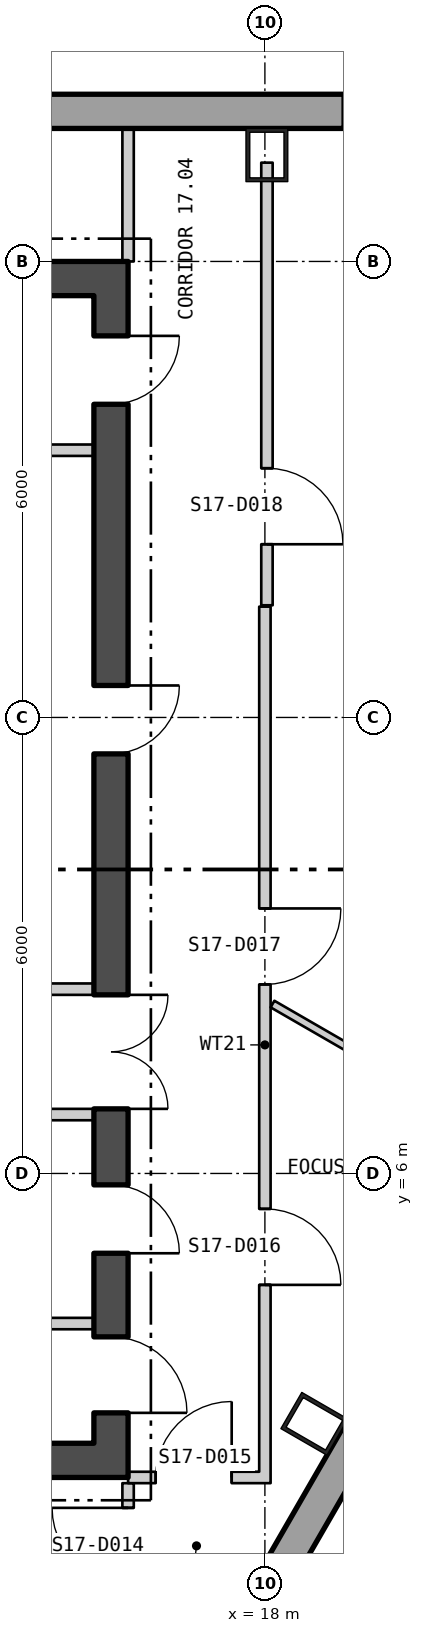
"""IFC4 building model, lengths in metres.
Left out: names, types, materials, properties, quantities, classifications, styles, units other than length and angle.
Written with IfcOpenShell. Run it as: python <this file> out.ifc"""

import sys

from ifc_helpers import new_model, si_unit, direction, frame, frame_2d, origin, origin_2d, place, context, subcontext, project, spatial, polyline, rectangle, hollow_rectangle, outline, extrude, element, fill, save


model = new_model("IFC4")
c1 = context("Model", 3, precision=1e-05, world=origin(), true_north=direction((0.0, 1.0)))
c2 = subcontext(c1, "Body", "Model", "MODEL_VIEW")
j1 = project(units=[si_unit("LENGTHUNIT", "METRE"), si_unit("PLANEANGLEUNIT", "RADIAN")], contexts=[c1])
p1 = place(None, origin())
s1 = spatial("IfcSite", under=j1, at=p1, CompositionType="ELEMENT")
p2 = place(p1, origin())
s2 = spatial("IfcBuilding", under=s1, at=p2, CompositionType="ELEMENT")
p3 = place(p2, frame((0.0, 0.0, 227.7)))
s3 = spatial("IfcBuildingStorey", under=s2, at=p3, CompositionType="ELEMENT", Elevation=227.7)
for number, where, z_axis, x_axis in (
    (1, (18.026, 19.4, 0.0), (0.0, 0.0, 1.0), (-1.0, 0.0, 0.0)),
    (2, (18.651, 2.706, 0.0), (0.0, 0.0, 1.0), (0.5, 0.866, 0.0)),
):
    element("IfcColumn", number, at=place(p3, frame(where, z_axis=z_axis, x_axis=x_axis)), inside=s3, PredefinedType="COLUMN", context=c2, shape_type="SweptSolid", body=[
        extrude(hollow_rectangle(XDim=0.55, YDim=0.7, WallThickness=0.05, at=origin_2d()), origin(), (0.0, 0.0, 1.0), 3.9),
    ])
p4 = place(p3, frame((22.865, 19.975, -0.4), z_axis=(0.0, 0.0, 1.0), x_axis=(-1.0, 0.0, 0.0)))
e3 = element("IfcWall", 3, at=p4, inside=s3, PredefinedType="SOLIDWALL", context=c2, shape_type="SweptSolid", body=[
    extrude(outline(polyline([(-0.13, -0.225), (45.86, -0.225), (45.6, 0.225), (0.13, 0.225), (-0.13, -0.225)])), origin(), (0.0, 0.0, 1.0), 3.9),
])
p5 = place(p4, frame((1.424, 0.0, 1.3)))
e4 = element("IfcOpeningElement", 4, at=p5, cuts=e3, PredefinedType="OPENING", context=c2, shape_type="SweptSolid", body=[
    extrude(rectangle(XDim=2.4, YDim=2.0, at=frame_2d((1.2, 1.0))), frame((0.0, 0.235, 0.0), z_axis=(0.0, -1.0, 0.0), x_axis=(1.0, 0.0, 0.0)), (0.0, 0.0, 1.0), 0.47),
])
p6 = place(p4, frame((10.399, 0.0, 1.3)))
e5 = element("IfcOpeningElement", 5, at=p6, cuts=e3, PredefinedType="OPENING", context=c2, shape_type="SweptSolid", body=[
    extrude(rectangle(XDim=2.4, YDim=2.0, at=frame_2d((1.2, 1.0))), frame((0.0, 0.235, 0.0), z_axis=(0.0, -1.0, 0.0), x_axis=(1.0, 0.0, 0.0)), (0.0, 0.0, 1.0), 0.47),
])
p7 = place(p4, frame((14.905, 0.0, 1.3)))
e6 = element("IfcOpeningElement", 6, at=p7, cuts=e3, PredefinedType="OPENING", context=c2, shape_type="SweptSolid", body=[
    extrude(rectangle(XDim=2.4, YDim=2.0, at=frame_2d((1.2, 1.0))), frame((0.0, 0.235, 0.0), z_axis=(0.0, -1.0, 0.0), x_axis=(1.0, 0.0, 0.0)), (0.0, 0.0, 1.0), 0.47),
])
p8 = place(p4, frame((19.412, 0.0, 1.3)))
e7 = element("IfcOpeningElement", 7, at=p8, cuts=e3, PredefinedType="OPENING", context=c2, shape_type="SweptSolid", body=[
    extrude(rectangle(XDim=2.4, YDim=2.0, at=frame_2d((1.2, 1.0))), frame((0.0, 0.235, 0.0), z_axis=(0.0, -1.0, 0.0), x_axis=(1.0, 0.0, 0.0)), (0.0, 0.0, 1.0), 0.47),
])
p9 = place(p4, frame((23.918, 0.0, 1.3)))
e8 = element("IfcOpeningElement", 8, at=p9, cuts=e3, PredefinedType="OPENING", context=c2, shape_type="SweptSolid", body=[
    extrude(rectangle(XDim=2.4, YDim=2.0, at=frame_2d((1.2, 1.0))), frame((0.0, 0.235, 0.0), z_axis=(0.0, -1.0, 0.0), x_axis=(1.0, 0.0, 0.0)), (0.0, 0.0, 1.0), 0.47),
])
p10 = place(p4, frame((28.425, 0.0, 1.3)))
e9 = element("IfcOpeningElement", 9, at=p10, cuts=e3, PredefinedType="OPENING", context=c2, shape_type="SweptSolid", body=[
    extrude(rectangle(XDim=2.4, YDim=2.0, at=frame_2d((1.2, 1.0))), frame((0.0, 0.235, 0.0), z_axis=(0.0, -1.0, 0.0), x_axis=(1.0, 0.0, 0.0)), (0.0, 0.0, 1.0), 0.47),
])
p11 = place(p4, frame((32.932, 0.0, 1.3)))
e10 = element("IfcOpeningElement", 10, at=p11, cuts=e3, PredefinedType="OPENING", context=c2, shape_type="SweptSolid", body=[
    extrude(rectangle(XDim=2.4, YDim=2.0, at=frame_2d((1.2, 1.0))), frame((0.0, 0.235, 0.0), z_axis=(0.0, -1.0, 0.0), x_axis=(1.0, 0.0, 0.0)), (0.0, 0.0, 1.0), 0.47),
])
p12 = place(p4, frame((41.907, 0.0, 1.3)))
e11 = element("IfcOpeningElement", 11, at=p12, cuts=e3, PredefinedType="OPENING", context=c2, shape_type="SweptSolid", body=[
    extrude(rectangle(XDim=2.4, YDim=2.0, at=frame_2d((1.2, 1.0))), frame((0.0, 0.235, 0.0), z_axis=(0.0, -1.0, 0.0), x_axis=(1.0, 0.0, 0.0)), (0.0, 0.0, 1.0), 0.47),
])
p13 = place(p3, frame((3.21, -25.189, -0.18), z_axis=(0.0, 0.0, 1.0), x_axis=(0.499999194392, 0.866025868902, 0.0)))
e12 = element("IfcWall", 12, at=p13, inside=s3, PredefinedType="SOLIDWALL", context=c2, shape_type="SweptSolid", body=[
    extrude(outline(polyline([(-0.13, -0.225), (45.86, -0.225), (45.6, 0.225), (0.13, 0.225), (-0.13, -0.225)])), origin(), (0.0, 0.0, 1.0), 3.68),
])
p14 = place(p13, frame((1.424, 0.0, 1.08)))
e13 = element("IfcOpeningElement", 13, at=p14, cuts=e12, PredefinedType="OPENING", context=c2, shape_type="SweptSolid", body=[
    extrude(rectangle(XDim=2.4, YDim=2.0, at=frame_2d((1.2, 1.0))), frame((0.0, 0.235, 0.0), z_axis=(0.0, -1.0, 0.0), x_axis=(1.0, 0.0, 0.0)), (0.0, 0.0, 1.0), 0.47),
])
p15 = place(p13, frame((5.892, 0.0, 1.08)))
e14 = element("IfcOpeningElement", 14, at=p15, cuts=e12, PredefinedType="OPENING", context=c2, shape_type="SweptSolid", body=[
    extrude(rectangle(XDim=2.4, YDim=2.0, at=frame_2d((1.2, 1.0))), frame((0.0, 0.235, 0.0), z_axis=(0.0, -1.0, 0.0), x_axis=(1.0, 0.0, 0.0)), (0.0, 0.0, 1.0), 0.47),
])
p16 = place(p13, frame((10.399, 0.0, 1.08)))
e15 = element("IfcOpeningElement", 15, at=p16, cuts=e12, PredefinedType="OPENING", context=c2, shape_type="SweptSolid", body=[
    extrude(rectangle(XDim=2.4, YDim=2.0, at=frame_2d((1.2, 1.0))), frame((0.0, 0.235, 0.0), z_axis=(0.0, -1.0, 0.0), x_axis=(1.0, 0.0, 0.0)), (0.0, 0.0, 1.0), 0.47),
])
p17 = place(p13, frame((14.905, 0.0, 1.08)))
e16 = element("IfcOpeningElement", 16, at=p17, cuts=e12, PredefinedType="OPENING", context=c2, shape_type="SweptSolid", body=[
    extrude(rectangle(XDim=2.4, YDim=2.0, at=frame_2d((1.2, 1.0))), frame((0.0, 0.235, 0.0), z_axis=(0.0, -1.0, 0.0), x_axis=(1.0, 0.0, 0.0)), (0.0, 0.0, 1.0), 0.47),
])
p18 = place(p13, frame((19.412, 0.0, 1.08)))
e17 = element("IfcOpeningElement", 17, at=p18, cuts=e12, PredefinedType="OPENING", context=c2, shape_type="SweptSolid", body=[
    extrude(rectangle(XDim=2.4, YDim=2.0, at=frame_2d((1.2, 1.0))), frame((0.0, 0.235, 0.0), z_axis=(0.0, -1.0, 0.0), x_axis=(1.0, 0.0, 0.0)), (0.0, 0.0, 1.0), 0.47),
])
p19 = place(p13, frame((23.918, 0.0, 1.08)))
e18 = element("IfcOpeningElement", 18, at=p19, cuts=e12, PredefinedType="OPENING", context=c2, shape_type="SweptSolid", body=[
    extrude(rectangle(XDim=2.4, YDim=2.0, at=frame_2d((1.2, 1.0))), frame((0.0, 0.235, 0.0), z_axis=(0.0, -1.0, 0.0), x_axis=(1.0, 0.0, 0.0)), (0.0, 0.0, 1.0), 0.47),
])
p20 = place(p13, frame((32.932, 0.0, 1.08)))
e19 = element("IfcOpeningElement", 19, at=p20, cuts=e12, PredefinedType="OPENING", context=c2, shape_type="SweptSolid", body=[
    extrude(rectangle(XDim=2.4, YDim=2.0, at=frame_2d((1.2, 1.0))), frame((0.0, 0.235, 0.0), z_axis=(0.0, -1.0, 0.0), x_axis=(1.0, 0.0, 0.0)), (0.0, 0.0, 1.0), 0.47),
])
p21 = place(p13, frame((37.438, 0.0, 1.08)))
e20 = element("IfcOpeningElement", 20, at=p21, cuts=e12, PredefinedType="OPENING", context=c2, shape_type="SweptSolid", body=[
    extrude(rectangle(XDim=2.4, YDim=2.0, at=frame_2d((1.2, 1.0))), frame((0.0, 0.235, 0.0), z_axis=(0.0, -1.0, 0.0), x_axis=(1.0, 0.0, 0.0)), (0.0, 0.0, 1.0), 0.47),
])
p22 = place(p13, frame((41.907, 0.0, 1.08)))
e21 = element("IfcOpeningElement", 21, at=p22, cuts=e12, PredefinedType="OPENING", context=c2, shape_type="SweptSolid", body=[
    extrude(rectangle(XDim=2.4, YDim=2.0, at=frame_2d((1.2, 1.0))), frame((0.0, 0.235, 0.0), z_axis=(0.0, -1.0, 0.0), x_axis=(1.0, 0.0, 0.0)), (0.0, 0.0, 1.0), 0.47),
])
p23 = place(p3, frame((-16.2, 2.225, 0.0), z_axis=(0.0, 0.0, 1.0), x_axis=(1.0, 0.0, 0.0)))
e22 = element("IfcWall", 22, at=p23, inside=s3, PredefinedType="SHEAR", context=c2, shape_type="SweptSolid", body=[
    extrude(rectangle(XDim=32.4, YDim=0.45, at=frame_2d((16.2, 0.0))), origin(), (0.0, 0.0, 1.0), 3.7),
])
p24 = place(p23, frame((10.7, 0.0, 0.0)))
e23 = element("IfcOpeningElement", 23, at=p24, cuts=e22, PredefinedType="OPENING", context=c2, shape_type="SweptSolid", body=[
    extrude(rectangle(XDim=1.8, YDim=2.4, at=frame_2d((0.9, 1.2))), frame((0.0, 0.235, 0.0), z_axis=(0.0, -1.0, 0.0), x_axis=(1.0, 0.0, 0.0)), (0.0, 0.0, 1.0), 0.47),
])
p25 = place(p23, frame((20.7, 0.0, 0.0)))
e24 = element("IfcOpeningElement", 24, at=p25, cuts=e22, PredefinedType="OPENING", context=c2, shape_type="SweptSolid", body=[
    extrude(rectangle(XDim=1.8, YDim=2.4, at=frame_2d((0.9, 1.2))), frame((0.0, 0.235, 0.0), z_axis=(0.0, -1.0, 0.0), x_axis=(1.0, 0.0, 0.0)), (0.0, 0.0, 1.0), 0.47),
])
p26 = place(p3, frame((-16.2, 17.775, 0.0), z_axis=(0.0, 0.0, 1.0), x_axis=(1.0, 0.0, 0.0)))
e25 = element("IfcWall", 25, at=p26, inside=s3, PredefinedType="SHEAR", context=c2, shape_type="SweptSolid", body=[
    extrude(rectangle(XDim=32.4, YDim=0.45, at=frame_2d((16.2, 0.0))), origin(), (0.0, 0.0, 1.0), 3.7),
])
p27 = place(p3, frame((15.975, 2.45, 0.0), z_axis=(0.0, 0.0, 1.0), x_axis=(0.0, 1.0, 0.0)))
e26 = element("IfcWall", 26, at=p27, inside=s3, PredefinedType="SHEAR", context=c2, shape_type="SweptSolid", body=[
    extrude(rectangle(XDim=15.1, YDim=0.45, at=frame_2d((7.55, 0.0))), origin(), (0.0, 0.0, 1.0), 3.7),
])
p28 = place(p27, frame((4.4, 0.0, 0.0)))
e27 = element("IfcOpeningElement", 27, at=p28, cuts=e26, PredefinedType="OPENING", context=c2, shape_type="SweptSolid", body=[
    extrude(rectangle(XDim=1.5, YDim=2.1, at=frame_2d((0.75, 1.05))), frame((0.0, 0.235, 0.0), z_axis=(0.0, -1.0, 0.0), x_axis=(1.0, 0.0, 0.0)), (0.0, 0.0, 1.0), 0.47),
])
p29 = place(p27, frame((0.4, 0.0, 0.0)))
e28 = element("IfcOpeningElement", 28, at=p29, cuts=e26, PredefinedType="OPENING", context=c2, shape_type="SweptSolid", body=[
    extrude(rectangle(XDim=1.0, YDim=2.1, at=frame_2d((0.5, 1.05))), frame((0.0, 0.235, 0.0), z_axis=(0.0, -1.0, 0.0), x_axis=(1.0, 0.0, 0.0)), (0.0, 0.0, 1.0), 0.47),
])
p30 = place(p27, frame((2.5, 0.0, 0.0)))
e29 = element("IfcOpeningElement", 29, at=p30, cuts=e26, PredefinedType="OPENING", context=c2, shape_type="SweptSolid", body=[
    extrude(rectangle(XDim=0.9, YDim=2.1, at=frame_2d((0.45, 1.05))), frame((0.0, 0.235, 0.0), z_axis=(0.0, -1.0, 0.0), x_axis=(1.0, 0.0, 0.0)), (0.0, 0.0, 1.0), 0.47),
])
p31 = place(p27, frame((9.071, 0.0, 0.0)))
e30 = element("IfcOpeningElement", 30, at=p31, cuts=e26, PredefinedType="OPENING", context=c2, shape_type="SweptSolid", body=[
    extrude(rectangle(XDim=0.9, YDim=2.1, at=frame_2d((0.45, 1.05))), frame((0.0, 0.235, 0.0), z_axis=(0.0, -1.0, 0.0), x_axis=(1.0, 0.0, 0.0)), (0.0, 0.0, 1.0), 0.47),
])
p32 = place(p27, frame((13.671, 0.0, 0.0)))
e31 = element("IfcOpeningElement", 31, at=p32, cuts=e26, PredefinedType="OPENING", context=c2, shape_type="SweptSolid", body=[
    extrude(rectangle(XDim=0.9, YDim=2.1, at=frame_2d((0.45, 1.05))), frame((0.0, 0.235, 0.0), z_axis=(0.0, -1.0, 0.0), x_axis=(1.0, 0.0, 0.0)), (0.0, 0.0, 1.0), 0.47),
])
for number, where, z_axis, x_axis in (
    (32, (14.5, 6.775, 0.0), (0.0, 0.0, 1.0), (1.0, 0.0, 0.0)),
    (33, (14.5, 8.425, 0.0), (0.0, 0.0, 1.0), (1.0, 0.0, 0.0)),
    (34, (14.5, 4.025, 0.0), (0.0, 0.0, 1.0), (1.0, 0.0, 0.0)),
    (35, (14.5, 15.516, 0.0), (0.0, 0.0, 1.0), (1.0, 0.0, 0.0)),
):
    element("IfcWall", number, at=place(p3, frame(where, z_axis=z_axis, x_axis=x_axis)), inside=s3, PredefinedType="PARTITIONING", context=c2, shape_type="SweptSolid", body=[
        extrude(rectangle(XDim=1.25, YDim=0.15, at=frame_2d((0.625, 0.0))), origin(), (0.0, 0.0, 1.0), 3.7),
    ])
p33 = place(p3, frame((16.2, 0.275, 0.0), z_axis=(0.0, 0.0, 1.0), x_axis=(0.0, 1.0, 0.0)))
e36 = element("IfcWall", 36, at=p33, inside=s3, PredefinedType="PARTITIONING", context=c2, shape_type="SweptSolid", body=[
    extrude(rectangle(XDim=1.65, YDim=0.15, at=frame_2d((0.825, 0.0))), origin(), (0.0, 0.0, 1.0), 3.7),
])
p34 = place(p33, frame((0.325, 0.0, 0.0)))
e37 = element("IfcOpeningElement", 37, at=p34, cuts=e36, PredefinedType="OPENING", context=c2, shape_type="SweptSolid", body=[
    extrude(rectangle(XDim=1.0, YDim=2.1, at=frame_2d((0.5, 1.05))), frame((0.0, 0.085, 0.0), z_axis=(0.0, -1.0, 0.0), x_axis=(1.0, 0.0, 0.0)), (0.0, 0.0, 1.0), 0.17),
])
p35 = place(p3, frame((16.2, 2.0, 0.0), z_axis=(0.0, 0.0, 1.0), x_axis=(1.0, 0.0, 0.0)))
e38 = element("IfcWall", 38, at=p35, inside=s3, PredefinedType="PARTITIONING", context=c2, shape_type="SweptSolid", body=[
    extrude(rectangle(XDim=1.725, YDim=0.15, at=frame_2d((0.863, 0.0))), origin(), (0.0, 0.0, 1.0), 3.11),
])
p36 = place(p35, frame((0.363, 0.0, 0.0)))
e39 = element("IfcOpeningElement", 39, at=p36, cuts=e38, PredefinedType="OPENING", context=c2, shape_type="SweptSolid", body=[
    extrude(rectangle(XDim=1.0, YDim=2.1, at=frame_2d((0.5, 1.05))), frame((0.0, 0.085, 0.0), z_axis=(0.0, -1.0, 0.0), x_axis=(1.0, 0.0, 0.0)), (0.0, 0.0, 1.0), 0.17),
])
p37 = place(p3, frame((16.2, 18.0, 0.0), z_axis=(0.0, 0.0, 1.0), x_axis=(0.0, 1.0, 0.0)))
e40 = element("IfcWall", 40, at=p37, inside=s3, PredefinedType="PARTITIONING", context=c2, shape_type="SweptSolid", body=[
    extrude(rectangle(XDim=1.75, YDim=0.15, at=frame_2d((0.875, 0.0))), origin(), (0.0, 0.0, 1.0), 3.7),
])
p38 = place(p3, frame((18.0, 1.925, 0.0), z_axis=(0.0, 0.0, 1.0), x_axis=(0.0, 1.0, 0.0)))
e41 = element("IfcWall", 41, at=p38, inside=s3, PredefinedType="PARTITIONING", context=c2, shape_type="SweptSolid", body=[
    extrude(rectangle(XDim=11.533, YDim=0.15, at=frame_2d((5.766, 0.0))), origin(), (0.0, 0.0, 1.0), 3.7),
])
p39 = place(p38, frame((2.609, 0.0, 0.0)))
e42 = element("IfcOpeningElement", 42, at=p39, cuts=e41, PredefinedType="OPENING", context=c2, shape_type="SweptSolid", body=[
    extrude(rectangle(XDim=1.0, YDim=2.1, at=frame_2d((0.5, 1.05))), frame((0.0, 0.085, 0.0), z_axis=(0.0, -1.0, 0.0), x_axis=(1.0, 0.0, 0.0)), (0.0, 0.0, 1.0), 0.17),
])
p40 = place(p38, frame((6.562, 0.0, 0.0)))
e43 = element("IfcOpeningElement", 43, at=p40, cuts=e41, PredefinedType="OPENING", context=c2, shape_type="SweptSolid", body=[
    extrude(rectangle(XDim=1.0, YDim=2.1, at=frame_2d((0.5, 1.05))), frame((0.0, 0.085, 0.0), z_axis=(0.0, -1.0, 0.0), x_axis=(1.0, 0.0, 0.0)), (0.0, 0.0, 1.0), 0.17),
])
p41 = place(p3, frame((18.027, 13.476, 0.0), z_axis=(0.0, 0.0, 1.0), x_axis=(0.0, 1.0, 0.0)))
e44 = element("IfcWall", 44, at=p41, inside=s3, PredefinedType="PARTITIONING", context=c2, shape_type="SweptSolid", body=[
    extrude(rectangle(XDim=5.824, YDim=0.15, at=frame_2d((2.912, 0.0))), origin(), (0.0, 0.0, 1.0), 3.7),
])
p42 = place(p41, frame((0.803, 0.0, 0.0)))
e45 = element("IfcOpeningElement", 45, at=p42, cuts=e44, PredefinedType="OPENING", context=c2, shape_type="SweptSolid", body=[
    extrude(rectangle(XDim=1.0, YDim=2.1, at=frame_2d((0.5, 1.05))), frame((0.0, 0.085, 0.0), z_axis=(0.0, -1.0, 0.0), x_axis=(1.0, 0.0, 0.0)), (0.0, 0.0, 1.0), 0.17),
])
p43 = place(p3, frame((18.1, 8.229, 0.0), z_axis=(0.0, 0.0, 1.0), x_axis=(0.866058244174, -0.499943114462, 0.0)))
e46 = element("IfcWall", 46, at=p43, inside=s3, PredefinedType="PARTITIONING", context=c2, shape_type="SweptSolid", body=[
    extrude(rectangle(XDim=3.138, YDim=0.1, at=frame_2d((1.569, 0.0))), origin(), (0.0, 0.0, 1.0), 3.7),
])
p44 = place(p28, origin())
e47 = element("IfcDoor", 47, at=p44, inside=s3, OperationType="DOUBLE_DOOR_SINGLE_SWING", PredefinedType="DOOR", context=c2, shape_type="SweptSolid", body=[
    extrude(rectangle(XDim=1.5, YDim=2.1, at=frame_2d((0.75, 1.05))), frame((0.0, 0.025, 0.0), z_axis=(0.0, -1.0, 0.0), x_axis=(1.0, 0.0, 0.0)), (0.0, 0.0, 1.0), 0.05),
])
fill(e27, e47)
p45 = place(p29, origin())
e48 = element("IfcDoor", 48, at=p45, inside=s3, OperationType="SINGLE_SWING_LEFT", PredefinedType="DOOR", context=c2, shape_type="SweptSolid", body=[
    extrude(rectangle(XDim=1.0, YDim=2.1, at=frame_2d((0.5, 1.05))), frame((0.0, 0.025, 0.0), z_axis=(0.0, -1.0, 0.0), x_axis=(1.0, 0.0, 0.0)), (0.0, 0.0, 1.0), 0.05),
])
fill(e28, e48)
p46 = place(p30, origin())
e49 = element("IfcDoor", 49, at=p46, inside=s3, OperationType="SINGLE_SWING_LEFT", PredefinedType="DOOR", context=c2, shape_type="SweptSolid", body=[
    extrude(rectangle(XDim=0.9, YDim=2.1, at=frame_2d((0.45, 1.05))), frame((0.0, 0.025, 0.0), z_axis=(0.0, -1.0, 0.0), x_axis=(1.0, 0.0, 0.0)), (0.0, 0.0, 1.0), 0.05),
])
fill(e29, e49)
p47 = place(p31, origin())
e50 = element("IfcDoor", 50, at=p47, inside=s3, OperationType="SINGLE_SWING_RIGHT", PredefinedType="DOOR", context=c2, shape_type="SweptSolid", body=[
    extrude(rectangle(XDim=0.9, YDim=2.1, at=frame_2d((0.45, 1.05))), frame((0.0, 0.025, 0.0), z_axis=(0.0, -1.0, 0.0), x_axis=(1.0, 0.0, 0.0)), (0.0, 0.0, 1.0), 0.05),
])
fill(e30, e50)
p48 = place(p32, origin())
e51 = element("IfcDoor", 51, at=p48, inside=s3, OperationType="SINGLE_SWING_RIGHT", PredefinedType="DOOR", context=c2, shape_type="SweptSolid", body=[
    extrude(rectangle(XDim=0.9, YDim=2.1, at=frame_2d((0.45, 1.05))), frame((0.0, 0.025, 0.0), z_axis=(0.0, -1.0, 0.0), x_axis=(1.0, 0.0, 0.0)), (0.0, 0.0, 1.0), 0.05),
])
fill(e31, e51)
p49 = place(p34, origin())
e52 = element("IfcDoor", 52, at=p49, inside=s3, OperationType="SINGLE_SWING_LEFT", PredefinedType="DOOR", context=c2, shape_type="SweptSolid", body=[
    extrude(rectangle(XDim=1.0, YDim=2.1, at=frame_2d((0.5, 1.05))), frame((0.0, 0.025, 0.0), z_axis=(0.0, -1.0, 0.0), x_axis=(1.0, 0.0, 0.0)), (0.0, 0.0, 1.0), 0.05),
])
fill(e37, e52)
p50 = place(p36, origin())
e53 = element("IfcDoor", 53, at=p50, inside=s3, OperationType="SINGLE_SWING_LEFT", PredefinedType="DOOR", context=c2, shape_type="SweptSolid", body=[
    extrude(rectangle(XDim=1.0, YDim=2.1, at=frame_2d((0.5, 1.05))), frame((0.0, 0.025, 0.0), z_axis=(0.0, -1.0, 0.0), x_axis=(1.0, 0.0, 0.0)), (0.0, 0.0, 1.0), 0.05),
])
fill(e39, e53)
p51 = place(p39, origin())
e54 = element("IfcDoor", 54, at=p51, inside=s3, OperationType="SINGLE_SWING_LEFT", PredefinedType="DOOR", context=c2, shape_type="SweptSolid", body=[
    extrude(rectangle(XDim=1.0, YDim=2.1, at=frame_2d((0.5, 1.05))), frame((0.0, 0.025, 0.0), z_axis=(0.0, -1.0, 0.0), x_axis=(1.0, 0.0, 0.0)), (0.0, 0.0, 1.0), 0.05),
])
fill(e42, e54)
p52 = place(p40, origin())
e55 = element("IfcDoor", 55, at=p52, inside=s3, OperationType="SINGLE_SWING_RIGHT", PredefinedType="DOOR", context=c2, shape_type="SweptSolid", body=[
    extrude(rectangle(XDim=1.0, YDim=2.1, at=frame_2d((0.5, 1.05))), frame((0.0, 0.025, 0.0), z_axis=(0.0, -1.0, 0.0), x_axis=(1.0, 0.0, 0.0)), (0.0, 0.0, 1.0), 0.05),
])
fill(e43, e55)
p53 = place(p42, origin())
e56 = element("IfcDoor", 56, at=p53, inside=s3, OperationType="SINGLE_SWING_LEFT", PredefinedType="DOOR", context=c2, shape_type="SweptSolid", body=[
    extrude(rectangle(XDim=1.0, YDim=2.1, at=frame_2d((0.5, 1.05))), frame((0.0, 0.025, 0.0), z_axis=(0.0, -1.0, 0.0), x_axis=(1.0, 0.0, 0.0)), (0.0, 0.0, 1.0), 0.05),
])
fill(e45, e56)
save(model, sys.argv[1])
